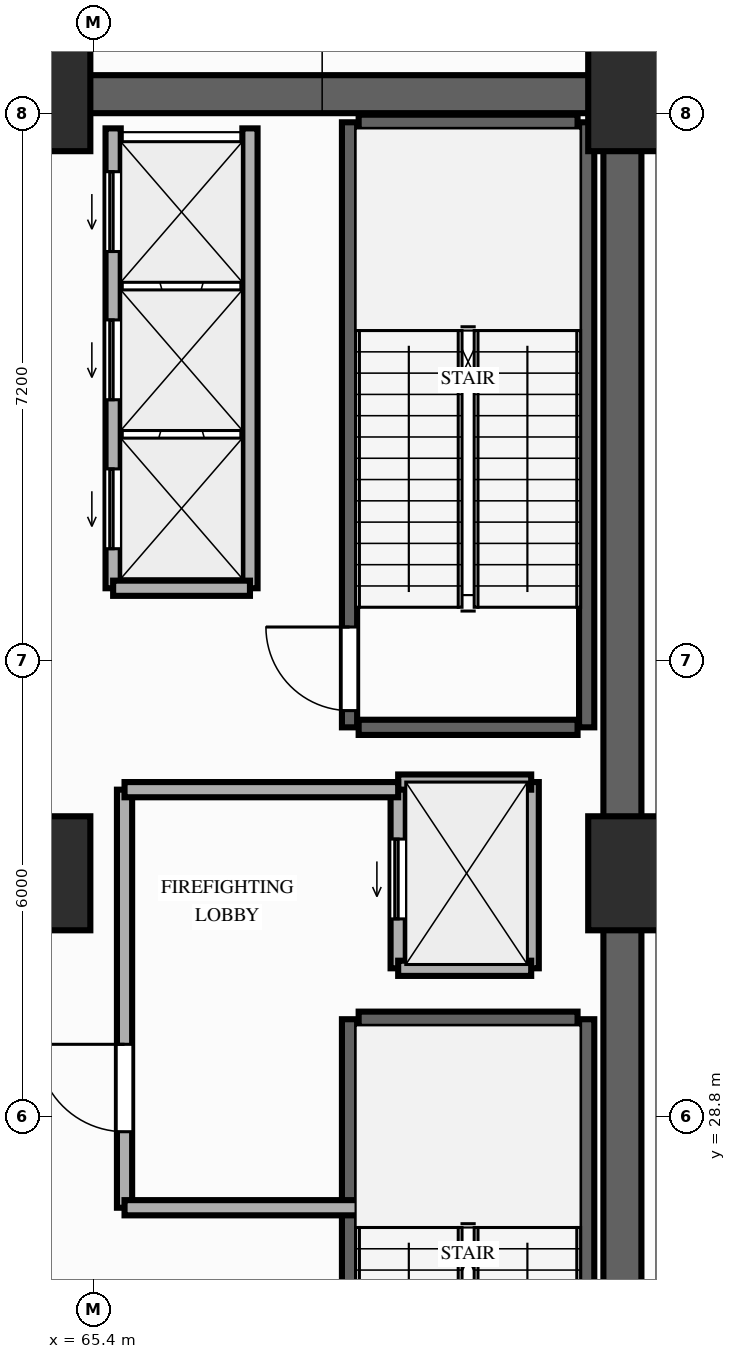
"""IFC4 building model, lengths in metres.
Left out: names, types, materials, properties, quantities, classifications, styles, units other than length and angle.
Written with IfcOpenShell. Run it as: python <this file> out.ifc"""

import sys

from ifc_helpers import new_model, si_unit, direction, frame, frame_2d, origin, origin_2d, place, context, subcontext, project, spatial, rectangle, extrude, element, fill, save


model = new_model("IFC4")
c1 = context("Model", 3, precision=1e-05, world=origin(), true_north=direction((0.0, 1.0)))
c2 = subcontext(c1, "Body", "Model", "MODEL_VIEW")
j1 = project(units=[si_unit("LENGTHUNIT", "METRE"), si_unit("PLANEANGLEUNIT", "RADIAN")], contexts=[c1])
p1 = place(None, origin())
s1 = spatial("IfcSite", under=j1, at=p1, CompositionType="ELEMENT")
p2 = place(p1, origin())
s2 = spatial("IfcBuilding", under=s1, at=p2, CompositionType="ELEMENT")
p3 = place(p2, frame((0.0, 0.0, 13.0)))
s3 = spatial("IfcBuildingStorey", under=s2, at=p3, CompositionType="ELEMENT", Elevation=13.0)
for number, where, z_axis, x_axis in (
    (1, (64.6, 32.0, 0.0), (0.0, 0.0, 1.0), (1.0, 0.0, 0.0)),
    (2, (72.65, 32.0, 0.0), (0.0, 0.0, 1.0), (1.0, 0.0, 0.0)),
    (3, (64.6, 42.25, 0.0), (0.0, 0.0, 1.0), (1.0, 0.0, 0.0)),
    (4, (72.65, 42.25, 0.0), (0.0, 0.0, 1.0), (1.0, 0.0, 0.0)),
):
    element("IfcColumn", number, at=place(p3, frame(where, z_axis=z_axis, x_axis=x_axis)), inside=s3, PredefinedType="COLUMN", context=c2, shape_type="SweptSolid", body=[
        extrude(rectangle(XDim=1.5, YDim=1.5, at=origin_2d()), origin(), (0.0, 0.0, 1.0), 4.6),
    ])
p4 = place(p3, frame((72.35, 22.0, 0.0), z_axis=(0.0, 0.0, 1.0), x_axis=(0.0, 1.0, 0.0)))
e5 = element("IfcWall", 5, at=p4, inside=s3, PredefinedType="SHEAR", context=c2, shape_type="SweptSolid", body=[
    extrude(rectangle(XDim=20.25, YDim=0.5, at=frame_2d((10.125, 0.0))), origin(), (0.0, 0.0, 1.0), 4.35),
])
p5 = place(p3, frame((64.6, 42.25, 0.0), z_axis=(0.0, 0.0, 1.0), x_axis=(1.0, 0.0, 0.0)))
e6 = element("IfcWall", 6, at=p5, inside=s3, PredefinedType="SHEAR", context=c2, shape_type="SweptSolid", body=[
    extrude(rectangle(XDim=7.5, YDim=0.5, at=frame_2d((3.75, 0.0))), origin(), (0.0, 0.0, 1.0), 4.35),
])
p6 = place(p3, frame((68.76, 22.26, 0.0), z_axis=(0.0, 0.0, 1.0), x_axis=(0.0, 1.0, 0.0)))
e7 = element("IfcWall", 7, at=p6, inside=s3, PredefinedType="SHEAR", context=c2, shape_type="SweptSolid", body=[
    extrude(rectangle(XDim=7.82, YDim=0.2, at=frame_2d((3.91, 0.0))), origin(), (0.0, 0.0, 1.0), 4.35),
])
p7 = place(p6, frame((0.22, 0.0, 0.0)))
e8 = element("IfcOpeningElement", 8, at=p7, cuts=e7, PredefinedType="OPENING", context=c2, shape_type="SweptSolid", body=[
    extrude(rectangle(XDim=1.1, YDim=2.15, at=frame_2d((0.55, 1.075))), frame((0.0, 0.11, 0.0), z_axis=(0.0, -1.0, 0.0), x_axis=(1.0, 0.0, 0.0)), (0.0, 0.0, 1.0), 0.22),
])
p8 = place(p3, frame((71.88, 22.26, 0.0), z_axis=(0.0, 0.0, 1.0), x_axis=(0.0, 1.0, 0.0)))
e9 = element("IfcWall", 9, at=p8, inside=s3, PredefinedType="SHEAR", context=c2, shape_type="SweptSolid", body=[
    extrude(rectangle(XDim=7.82, YDim=0.2, at=frame_2d((3.91, 0.0))), origin(), (0.0, 0.0, 1.0), 4.35),
])
p9 = place(p3, frame((68.88, 30.08, 0.0), z_axis=(0.0, 0.0, 1.0), x_axis=(1.0, 0.0, 0.0)))
e10 = element("IfcWall", 10, at=p9, inside=s3, PredefinedType="SHEAR", context=c2, shape_type="SweptSolid", body=[
    extrude(rectangle(XDim=2.88, YDim=0.2, at=frame_2d((1.44, 0.0))), origin(), (0.0, 0.0, 1.0), 4.35),
])
p10 = place(p3, frame((68.76, 33.92, 0.0), z_axis=(0.0, 0.0, 1.0), x_axis=(0.0, 1.0, 0.0)))
e11 = element("IfcWall", 11, at=p10, inside=s3, PredefinedType="SHEAR", context=c2, shape_type="SweptSolid", body=[
    extrude(rectangle(XDim=7.96, YDim=0.2, at=frame_2d((3.98, 0.0))), origin(), (0.0, 0.0, 1.0), 4.35),
])
p11 = place(p10, frame((0.22, 0.0, 0.0)))
e12 = element("IfcOpeningElement", 12, at=p11, cuts=e11, PredefinedType="OPENING", context=c2, shape_type="SweptSolid", body=[
    extrude(rectangle(XDim=1.1, YDim=2.15, at=frame_2d((0.55, 1.075))), frame((0.0, 0.11, 0.0), z_axis=(0.0, -1.0, 0.0), x_axis=(1.0, 0.0, 0.0)), (0.0, 0.0, 1.0), 0.22),
])
p12 = place(p3, frame((71.88, 33.92, 0.0), z_axis=(0.0, 0.0, 1.0), x_axis=(0.0, 1.0, 0.0)))
e13 = element("IfcWall", 13, at=p12, inside=s3, PredefinedType="SHEAR", context=c2, shape_type="SweptSolid", body=[
    extrude(rectangle(XDim=7.96, YDim=0.2, at=frame_2d((3.98, 0.0))), origin(), (0.0, 0.0, 1.0), 4.35),
])
for number, where, z_axis, x_axis in (
    (14, (68.88, 41.88, 0.0), (0.0, 0.0, 1.0), (1.0, 0.0, 0.0)),
    (15, (68.88, 33.92, 0.0), (0.0, 0.0, 1.0), (1.0, 0.0, 0.0)),
):
    element("IfcWall", number, at=place(p3, frame(where, z_axis=z_axis, x_axis=x_axis)), inside=s3, PredefinedType="SHEAR", context=c2, shape_type="SweptSolid", body=[
        extrude(rectangle(XDim=2.88, YDim=0.2, at=frame_2d((1.44, 0.0))), origin(), (0.0, 0.0, 1.0), 4.35),
    ])
p13 = place(p3, frame((65.65, 35.75, 0.0), z_axis=(0.0, 0.0, 1.0), x_axis=(0.0, 1.0, 0.0)))
e16 = element("IfcWall", 16, at=p13, inside=s3, PredefinedType="MOVABLE", context=c2, shape_type="SweptSolid", body=[
    extrude(rectangle(XDim=6.05, YDim=0.2, at=frame_2d((3.025, 0.0))), origin(), (0.0, 0.0, 1.0), 4.35),
])
p14 = place(p13, frame((0.52, 0.0, 0.0)))
e17 = element("IfcOpeningElement", 17, at=p14, cuts=e16, PredefinedType="OPENING", context=c2, shape_type="SweptSolid", body=[
    extrude(rectangle(XDim=1.05, YDim=2.15, at=frame_2d((0.525, 1.075))), frame((0.0, 0.11, 0.0), z_axis=(0.0, -1.0, 0.0), x_axis=(1.0, 0.0, 0.0)), (0.0, 0.0, 1.0), 0.22),
])
p15 = place(p13, frame((2.48, 0.0, 0.0)))
e18 = element("IfcOpeningElement", 18, at=p15, cuts=e16, PredefinedType="OPENING", context=c2, shape_type="SweptSolid", body=[
    extrude(rectangle(XDim=1.05, YDim=2.15, at=frame_2d((0.525, 1.075))), frame((0.0, 0.11, 0.0), z_axis=(0.0, -1.0, 0.0), x_axis=(1.0, 0.0, 0.0)), (0.0, 0.0, 1.0), 0.22),
])
p16 = place(p13, frame((4.43, 0.0, 0.0)))
e19 = element("IfcOpeningElement", 19, at=p16, cuts=e16, PredefinedType="OPENING", context=c2, shape_type="SweptSolid", body=[
    extrude(rectangle(XDim=1.05, YDim=2.15, at=frame_2d((0.525, 1.075))), frame((0.0, 0.11, 0.0), z_axis=(0.0, -1.0, 0.0), x_axis=(1.0, 0.0, 0.0)), (0.0, 0.0, 1.0), 0.22),
])
p17 = place(p3, frame((67.45, 35.75, 0.0), z_axis=(0.0, 0.0, 1.0), x_axis=(0.0, 1.0, 0.0)))
e20 = element("IfcWall", 20, at=p17, inside=s3, PredefinedType="MOVABLE", context=c2, shape_type="SweptSolid", body=[
    extrude(rectangle(XDim=6.05, YDim=0.2, at=frame_2d((3.025, 0.0))), origin(), (0.0, 0.0, 1.0), 4.35),
])
p18 = place(p3, frame((65.65, 35.75, 0.0), z_axis=(0.0, 0.0, 1.0), x_axis=(1.0, 0.0, 0.0)))
e21 = element("IfcWall", 21, at=p18, inside=s3, PredefinedType="MOVABLE", context=c2, shape_type="SweptSolid", body=[
    extrude(rectangle(XDim=1.8, YDim=0.2, at=frame_2d((0.9, 0.0))), origin(), (0.0, 0.0, 1.0), 4.35),
])
p19 = place(p3, frame((69.4, 30.75, 0.0), z_axis=(0.0, 0.0, 1.0), x_axis=(0.0, 1.0, 0.0)))
e22 = element("IfcWall", 22, at=p19, inside=s3, PredefinedType="MOVABLE", context=c2, shape_type="SweptSolid", body=[
    extrude(rectangle(XDim=2.45, YDim=0.2, at=frame_2d((1.225, 0.0))), origin(), (0.0, 0.0, 1.0), 4.35),
])
p20 = place(p19, frame((0.65, 0.0, 0.0)))
e23 = element("IfcOpeningElement", 23, at=p20, cuts=e22, PredefinedType="OPENING", context=c2, shape_type="SweptSolid", body=[
    extrude(rectangle(XDim=1.05, YDim=2.15, at=frame_2d((0.525, 1.075))), frame((0.0, 0.11, 0.0), z_axis=(0.0, -1.0, 0.0), x_axis=(1.0, 0.0, 0.0)), (0.0, 0.0, 1.0), 0.22),
])
p21 = place(p3, frame((71.15, 30.75, 0.0), z_axis=(0.0, 0.0, 1.0), x_axis=(0.0, 1.0, 0.0)))
e24 = element("IfcWall", 24, at=p21, inside=s3, PredefinedType="MOVABLE", context=c2, shape_type="SweptSolid", body=[
    extrude(rectangle(XDim=2.45, YDim=0.2, at=frame_2d((1.225, 0.0))), origin(), (0.0, 0.0, 1.0), 4.35),
])
for number, where, z_axis, x_axis in (
    (25, (69.4, 33.2, 0.0), (0.0, 0.0, 1.0), (1.0, 0.0, 0.0)),
    (26, (69.4, 30.75, 0.0), (0.0, 0.0, 1.0), (1.0, 0.0, 0.0)),
):
    element("IfcWall", number, at=place(p3, frame(where, z_axis=z_axis, x_axis=x_axis)), inside=s3, PredefinedType="MOVABLE", context=c2, shape_type="SweptSolid", body=[
        extrude(rectangle(XDim=1.75, YDim=0.2, at=frame_2d((0.875, 0.0))), origin(), (0.0, 0.0, 1.0), 4.35),
    ])
p22 = place(p3, frame((65.8, 27.6, 0.0), z_axis=(0.0, 0.0, 1.0), x_axis=(0.0, 1.0, 0.0)))
e27 = element("IfcWall", 27, at=p22, inside=s3, PredefinedType="PARTITIONING", context=c2, shape_type="SweptSolid", body=[
    extrude(rectangle(XDim=5.5, YDim=0.2, at=frame_2d((2.75, 0.0))), origin(), (0.0, 0.0, 1.0), 4.35),
])
p23 = place(p22, frame((1.0, 0.0, 0.0)))
e28 = element("IfcOpeningElement", 28, at=p23, cuts=e27, PredefinedType="OPENING", context=c2, shape_type="SweptSolid", body=[
    extrude(rectangle(XDim=1.15, YDim=2.15, at=frame_2d((0.575, 1.075))), frame((0.0, 0.11, 0.0), z_axis=(0.0, -1.0, 0.0), x_axis=(1.0, 0.0, 0.0)), (0.0, 0.0, 1.0), 0.22),
])
p24 = place(p3, frame((65.8, 33.1, 0.0), z_axis=(0.0, 0.0, 1.0), x_axis=(1.0, 0.0, 0.0)))
e29 = element("IfcWall", 29, at=p24, inside=s3, PredefinedType="PARTITIONING", context=c2, shape_type="SweptSolid", body=[
    extrude(rectangle(XDim=3.6, YDim=0.2, at=frame_2d((1.8, 0.0))), origin(), (0.0, 0.0, 1.0), 4.35),
])
p25 = place(p3, frame((65.8, 27.6, 0.0), z_axis=(0.0, 0.0, 1.0), x_axis=(1.0, 0.0, 0.0)))
e30 = element("IfcWall", 30, at=p25, inside=s3, PredefinedType="PARTITIONING", context=c2, shape_type="SweptSolid", body=[
    extrude(rectangle(XDim=3.4, YDim=0.2, at=frame_2d((1.7, 0.0))), origin(), (0.0, 0.0, 1.0), 4.35),
])
p26 = place(p11, origin())
e31 = element("IfcDoor", 31, at=p26, inside=s3, OperationType="SINGLE_SWING_RIGHT", PredefinedType="DOOR", context=c2, shape_type="SweptSolid", body=[
    extrude(rectangle(XDim=1.1, YDim=2.15, at=frame_2d((0.55, 1.075))), frame((0.0, 0.025, 0.0), z_axis=(0.0, -1.0, 0.0), x_axis=(1.0, 0.0, 0.0)), (0.0, 0.0, 1.0), 0.05),
])
fill(e12, e31)
p27 = place(p14, origin())
e32 = element("IfcDoor", 32, at=p27, inside=s3, OperationType="SLIDING_TO_LEFT", PredefinedType="DOOR", context=c2, shape_type="SweptSolid", body=[
    extrude(rectangle(XDim=1.05, YDim=2.15, at=frame_2d((0.525, 1.075))), frame((0.0, 0.025, 0.0), z_axis=(0.0, -1.0, 0.0), x_axis=(1.0, 0.0, 0.0)), (0.0, 0.0, 1.0), 0.05),
])
fill(e17, e32)
p28 = place(p15, origin())
e33 = element("IfcDoor", 33, at=p28, inside=s3, OperationType="SLIDING_TO_LEFT", PredefinedType="DOOR", context=c2, shape_type="SweptSolid", body=[
    extrude(rectangle(XDim=1.05, YDim=2.15, at=frame_2d((0.525, 1.075))), frame((0.0, 0.025, 0.0), z_axis=(0.0, -1.0, 0.0), x_axis=(1.0, 0.0, 0.0)), (0.0, 0.0, 1.0), 0.05),
])
fill(e18, e33)
p29 = place(p16, origin())
e34 = element("IfcDoor", 34, at=p29, inside=s3, OperationType="SLIDING_TO_LEFT", PredefinedType="DOOR", context=c2, shape_type="SweptSolid", body=[
    extrude(rectangle(XDim=1.05, YDim=2.15, at=frame_2d((0.525, 1.075))), frame((0.0, 0.025, 0.0), z_axis=(0.0, -1.0, 0.0), x_axis=(1.0, 0.0, 0.0)), (0.0, 0.0, 1.0), 0.05),
])
fill(e19, e34)
p30 = place(p20, origin())
e35 = element("IfcDoor", 35, at=p30, inside=s3, OperationType="SLIDING_TO_LEFT", PredefinedType="DOOR", context=c2, shape_type="SweptSolid", body=[
    extrude(rectangle(XDim=1.05, YDim=2.15, at=frame_2d((0.525, 1.075))), frame((0.0, 0.025, 0.0), z_axis=(0.0, -1.0, 0.0), x_axis=(1.0, 0.0, 0.0)), (0.0, 0.0, 1.0), 0.05),
])
fill(e23, e35)
p31 = place(p23, origin())
e36 = element("IfcDoor", 36, at=p31, inside=s3, OperationType="SINGLE_SWING_RIGHT", PredefinedType="DOOR", context=c2, shape_type="SweptSolid", body=[
    extrude(rectangle(XDim=1.15, YDim=2.15, at=frame_2d((0.575, 1.075))), frame((0.0, 0.025, 0.0), z_axis=(0.0, -1.0, 0.0), x_axis=(1.0, 0.0, 0.0)), (0.0, 0.0, 1.0), 0.05),
])
fill(e28, e36)
save(model, sys.argv[1])
